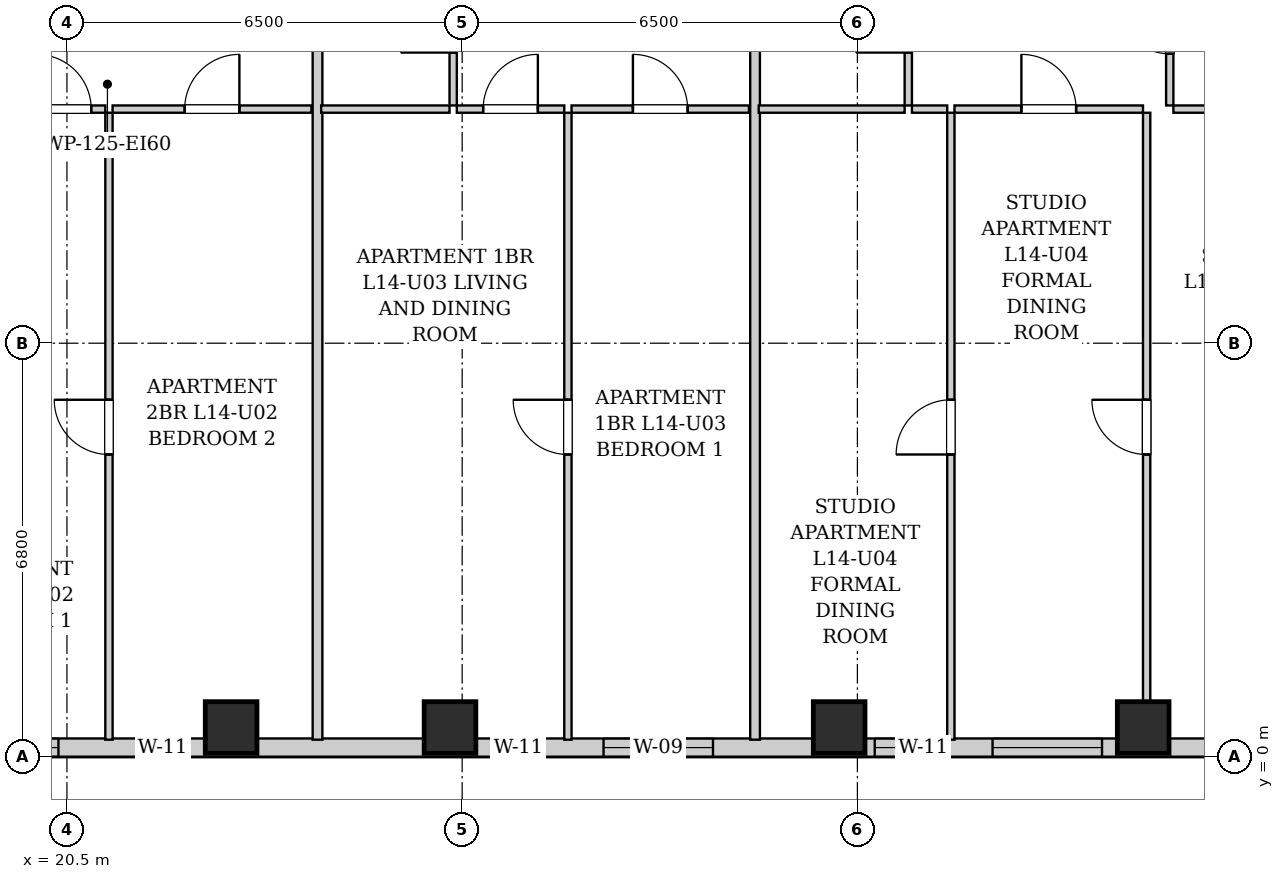
"""IFC4 building model, lengths in metres.
Left out: names, types, materials, properties, quantities, classifications, styles, units other than length and angle.
Written with IfcOpenShell. Run it as: python <this file> out.ifc"""

import sys

from ifc_helpers import new_model, si_unit, direction, frame, frame_2d, origin, origin_2d, place, context, subcontext, project, spatial, rectangle, extrude, element, fill, save


model = new_model("IFC4")
c1 = context("Model", 3, precision=1e-05, world=origin(), true_north=direction((0.0, 1.0)))
c2 = subcontext(c1, "Body", "Model", "MODEL_VIEW")
j1 = project(units=[si_unit("LENGTHUNIT", "METRE"), si_unit("PLANEANGLEUNIT", "RADIAN")], contexts=[c1])
p1 = place(None, origin())
s1 = spatial("IfcSite", under=j1, at=p1, CompositionType="ELEMENT")
p2 = place(p1, origin())
s2 = spatial("IfcBuilding", under=s1, at=p2, CompositionType="ELEMENT")
p3 = place(p2, frame((0.0, 0.0, 54.6)))
s3 = spatial("IfcBuildingStorey", under=s2, at=p3, CompositionType="ELEMENT", Elevation=54.6)
for number, where, z_axis, x_axis in (
    (1, (23.2, 0.48, 0.0), (0.0, 0.0, 1.0), (1.0, 0.0, 0.0)),
    (2, (26.8, 0.48, 0.0), (0.0, 0.0, 1.0), (1.0, 0.0, 0.0)),
    (3, (33.2, 0.48, 0.0), (0.0, 0.0, 1.0), (1.0, 0.0, 0.0)),
    (4, (38.2, 0.48, 0.0), (0.0, 0.0, 1.0), (1.0, 0.0, 0.0)),
):
    element("IfcColumn", number, at=place(p3, frame(where, z_axis=z_axis, x_axis=x_axis)), inside=s3, PredefinedType="COLUMN", context=c2, shape_type="SweptSolid", body=[
        extrude(rectangle(XDim=0.85, YDim=0.85, at=origin_2d()), origin(), (0.0, 0.0, 1.0), 3.2),
    ])
p4 = place(p3, frame((44.0, 0.15, 0.0), z_axis=(0.0, 0.0, 1.0), x_axis=(-1.0, 0.0, 0.0)))
e5 = element("IfcWall", 5, at=p4, inside=s3, PredefinedType="SOLIDWALL", context=c2, shape_type="SweptSolid", body=[
    extrude(rectangle(XDim=27.55, YDim=0.3, at=frame_2d((13.775, 0.0))), origin(), (0.0, 0.0, 1.0), 1.975),
])
p5 = place(p4, frame((23.64, 0.0, 0.55)))
e6 = element("IfcOpeningElement", 6, at=p5, cuts=e5, PredefinedType="OPENING", context=c2, shape_type="SweptSolid", body=[
    extrude(rectangle(XDim=1.8, YDim=1.2, at=frame_2d((0.9, 0.6))), frame((0.0, 0.16, 0.0), z_axis=(0.0, -1.0, 0.0), x_axis=(1.0, 0.0, 0.0)), (0.0, 0.0, 1.0), 0.32),
])
p6 = place(p4, frame((21.5, 0.0, 0.55)))
e7 = element("IfcOpeningElement", 7, at=p6, cuts=e5, PredefinedType="OPENING", context=c2, shape_type="SweptSolid", body=[
    extrude(rectangle(XDim=0.85, YDim=1.2, at=frame_2d((0.425, 0.6))), frame((0.0, 0.16, 0.0), z_axis=(0.0, -1.0, 0.0), x_axis=(1.0, 0.0, 0.0)), (0.0, 0.0, 1.0), 0.32),
])
p7 = place(p4, frame((15.65, 0.0, 0.55)))
e8 = element("IfcOpeningElement", 8, at=p7, cuts=e5, PredefinedType="OPENING", context=c2, shape_type="SweptSolid", body=[
    extrude(rectangle(XDim=0.85, YDim=1.2, at=frame_2d((0.425, 0.6))), frame((0.0, 0.16, 0.0), z_axis=(0.0, -1.0, 0.0), x_axis=(1.0, 0.0, 0.0)), (0.0, 0.0, 1.0), 0.32),
])
p8 = place(p4, frame((12.875, 0.0, 0.55)))
e9 = element("IfcOpeningElement", 9, at=p8, cuts=e5, PredefinedType="OPENING", context=c2, shape_type="SweptSolid", body=[
    extrude(rectangle(XDim=1.8, YDim=1.2, at=frame_2d((0.9, 0.6))), frame((0.0, 0.16, 0.0), z_axis=(0.0, -1.0, 0.0), x_axis=(1.0, 0.0, 0.0)), (0.0, 0.0, 1.0), 0.32),
])
p9 = place(p4, frame((9.365, 0.0, 0.55)))
e10 = element("IfcOpeningElement", 10, at=p9, cuts=e5, PredefinedType="OPENING", context=c2, shape_type="SweptSolid", body=[
    extrude(rectangle(XDim=0.85, YDim=1.2, at=frame_2d((0.425, 0.6))), frame((0.0, 0.16, 0.0), z_axis=(0.0, -1.0, 0.0), x_axis=(1.0, 0.0, 0.0)), (0.0, 0.0, 1.0), 0.32),
])
p10 = place(p4, frame((6.477, 0.0, 0.55)))
e11 = element("IfcOpeningElement", 11, at=p10, cuts=e5, PredefinedType="OPENING", context=c2, shape_type="SweptSolid", body=[
    extrude(rectangle(XDim=1.8, YDim=1.2, at=frame_2d((0.9, 0.6))), frame((0.0, 0.16, 0.0), z_axis=(0.0, -1.0, 0.0), x_axis=(1.0, 0.0, 0.0)), (0.0, 0.0, 1.0), 0.32),
])
p11 = place(p4, frame((2.186, 0.0, 0.55)))
e12 = element("IfcOpeningElement", 12, at=p11, cuts=e5, PredefinedType="OPENING", context=c2, shape_type="SweptSolid", body=[
    extrude(rectangle(XDim=1.8, YDim=1.2, at=frame_2d((0.9, 0.6))), frame((0.0, 0.16, 0.0), z_axis=(0.0, -1.0, 0.0), x_axis=(1.0, 0.0, 0.0)), (0.0, 0.0, 1.0), 0.32),
])
p12 = place(p3, frame((19.767, 10.65, 0.0), z_axis=(0.0, 0.0, 1.0), x_axis=(1.0, 0.0, 0.0)))
e13 = element("IfcWall", 13, at=p12, inside=s3, PredefinedType="PARTITIONING", context=c2, shape_type="SweptSolid", body=[
    extrude(rectangle(XDim=1.364, YDim=0.12, at=frame_2d((0.682, 0.0))), origin(), (0.0, 0.0, 1.0), 2.94),
])
p13 = place(p12, frame((0.232, 0.0, 0.0)))
e14 = element("IfcOpeningElement", 14, at=p13, cuts=e13, PredefinedType="OPENING", context=c2, shape_type="SweptSolid", body=[
    extrude(rectangle(XDim=0.9, YDim=2.05, at=frame_2d((0.45, 1.025))), frame((0.0, 0.07, 0.0), z_axis=(0.0, -1.0, 0.0), x_axis=(1.0, 0.0, 0.0)), (0.0, 0.0, 1.0), 0.14),
])
p14 = place(p3, frame((21.251, 10.65, 0.0), z_axis=(0.0, 0.0, 1.0), x_axis=(1.0, 0.0, 0.0)))
e15 = element("IfcWall", 15, at=p14, inside=s3, PredefinedType="PARTITIONING", context=c2, shape_type="SweptSolid", body=[
    extrude(rectangle(XDim=3.27, YDim=0.12, at=frame_2d((1.635, 0.0))), origin(), (0.0, 0.0, 1.0), 2.94),
])
p15 = place(p14, frame((1.185, 0.0, 0.0)))
e16 = element("IfcOpeningElement", 16, at=p15, cuts=e15, PredefinedType="OPENING", context=c2, shape_type="SweptSolid", body=[
    extrude(rectangle(XDim=0.9, YDim=2.05, at=frame_2d((0.45, 1.025))), frame((0.0, 0.07, 0.0), z_axis=(0.0, -1.0, 0.0), x_axis=(1.0, 0.0, 0.0)), (0.0, 0.0, 1.0), 0.14),
])
p16 = place(p3, frame((21.191, 0.28, 0.0), z_axis=(0.0, 0.0, 1.0), x_axis=(0.0, 1.0, 0.0)))
e17 = element("IfcWall", 17, at=p16, inside=s3, PredefinedType="PARTITIONING", context=c2, shape_type="SweptSolid", body=[
    extrude(rectangle(XDim=10.31, YDim=0.12, at=frame_2d((5.155, 0.0))), origin(), (0.0, 0.0, 1.0), 2.94),
])
p17 = place(p16, frame((4.69, 0.0, 0.0)))
e18 = element("IfcOpeningElement", 18, at=p17, cuts=e17, PredefinedType="OPENING", context=c2, shape_type="SweptSolid", body=[
    extrude(rectangle(XDim=0.9, YDim=2.05, at=frame_2d((0.45, 1.025))), frame((0.0, 0.07, 0.0), z_axis=(0.0, -1.0, 0.0), x_axis=(1.0, 0.0, 0.0)), (0.0, 0.0, 1.0), 0.14),
])
p18 = place(p3, frame((24.621, 0.28, 0.0), z_axis=(0.0, 0.0, 1.0), x_axis=(0.0, 1.0, 0.0)))
e19 = element("IfcWall", 19, at=p18, inside=s3, PredefinedType="PARTITIONING", context=c2, shape_type="SweptSolid", body=[
    extrude(rectangle(XDim=13.03, YDim=0.16, at=frame_2d((6.515, 0.0))), origin(), (0.0, 0.0, 1.0), 2.94),
])
p19 = place(p3, frame((26.852, 10.71, 0.0), z_axis=(0.0, 0.0, 1.0), x_axis=(0.0, 1.0, 0.0)))
e20 = element("IfcWall", 20, at=p19, inside=s3, PredefinedType="PARTITIONING", context=c2, shape_type="SweptSolid", body=[
    extrude(rectangle(XDim=2.6, YDim=0.12, at=frame_2d((1.3, 0.0))), origin(), (0.0, 0.0, 1.0), 2.94),
])
p20 = place(p19, frame((0.87, 0.0, 0.0)))
e21 = element("IfcOpeningElement", 21, at=p20, cuts=e20, PredefinedType="OPENING", context=c2, shape_type="SweptSolid", body=[
    extrude(rectangle(XDim=0.86, YDim=2.05, at=frame_2d((0.43, 1.025))), frame((0.0, 0.07, 0.0), z_axis=(0.0, -1.0, 0.0), x_axis=(1.0, 0.0, 0.0)), (0.0, 0.0, 1.0), 0.14),
])
p21 = place(p3, frame((24.681, 10.65, 0.0), z_axis=(0.0, 0.0, 1.0), x_axis=(1.0, 0.0, 0.0)))
e22 = element("IfcWall", 22, at=p21, inside=s3, PredefinedType="PARTITIONING", context=c2, shape_type="SweptSolid", body=[
    extrude(rectangle(XDim=2.111, YDim=0.12, at=frame_2d((1.056, 0.0))), origin(), (0.0, 0.0, 1.0), 2.94),
])
p22 = place(p3, frame((26.912, 10.65, 0.0), z_axis=(0.0, 0.0, 1.0), x_axis=(1.0, 0.0, 0.0)))
e23 = element("IfcWall", 23, at=p22, inside=s3, PredefinedType="PARTITIONING", context=c2, shape_type="SweptSolid", body=[
    extrude(rectangle(XDim=1.767, YDim=0.12, at=frame_2d((0.883, 0.0))), origin(), (0.0, 0.0, 1.0), 2.94),
])
p23 = place(p22, frame((0.433, 0.0, 0.0)))
e24 = element("IfcOpeningElement", 24, at=p23, cuts=e23, PredefinedType="OPENING", context=c2, shape_type="SweptSolid", body=[
    extrude(rectangle(XDim=0.9, YDim=2.05, at=frame_2d((0.45, 1.025))), frame((0.0, 0.07, 0.0), z_axis=(0.0, -1.0, 0.0), x_axis=(1.0, 0.0, 0.0)), (0.0, 0.0, 1.0), 0.14),
])
p24 = place(p3, frame((28.799, 10.65, 0.0), z_axis=(0.0, 0.0, 1.0), x_axis=(1.0, 0.0, 0.0)))
e25 = element("IfcWall", 25, at=p24, inside=s3, PredefinedType="PARTITIONING", context=c2, shape_type="SweptSolid", body=[
    extrude(rectangle(XDim=2.918, YDim=0.12, at=frame_2d((1.459, 0.0))), origin(), (0.0, 0.0, 1.0), 2.94),
])
p25 = place(p24, frame((1.009, 0.0, 0.0)))
e26 = element("IfcOpeningElement", 26, at=p25, cuts=e25, PredefinedType="OPENING", context=c2, shape_type="SweptSolid", body=[
    extrude(rectangle(XDim=0.9, YDim=2.05, at=frame_2d((0.45, 1.025))), frame((0.0, 0.07, 0.0), z_axis=(0.0, -1.0, 0.0), x_axis=(1.0, 0.0, 0.0)), (0.0, 0.0, 1.0), 0.14),
])
p26 = place(p3, frame((28.739, 0.28, 0.0), z_axis=(0.0, 0.0, 1.0), x_axis=(0.0, 1.0, 0.0)))
e27 = element("IfcWall", 27, at=p26, inside=s3, PredefinedType="PARTITIONING", context=c2, shape_type="SweptSolid", body=[
    extrude(rectangle(XDim=10.31, YDim=0.12, at=frame_2d((5.155, 0.0))), origin(), (0.0, 0.0, 1.0), 2.94),
])
p27 = place(p26, frame((4.69, 0.0, 0.0)))
e28 = element("IfcOpeningElement", 28, at=p27, cuts=e27, PredefinedType="OPENING", context=c2, shape_type="SweptSolid", body=[
    extrude(rectangle(XDim=0.9, YDim=2.05, at=frame_2d((0.45, 1.025))), frame((0.0, 0.07, 0.0), z_axis=(0.0, -1.0, 0.0), x_axis=(1.0, 0.0, 0.0)), (0.0, 0.0, 1.0), 0.14),
])
p28 = place(p3, frame((31.817, 0.28, 0.0), z_axis=(0.0, 0.0, 1.0), x_axis=(0.0, 1.0, 0.0)))
e29 = element("IfcWall", 29, at=p28, inside=s3, PredefinedType="PARTITIONING", context=c2, shape_type="SweptSolid", body=[
    extrude(rectangle(XDim=13.03, YDim=0.16, at=frame_2d((6.515, 0.0))), origin(), (0.0, 0.0, 1.0), 2.94),
])
p29 = place(p3, frame((34.337, 10.71, 0.0), z_axis=(0.0, 0.0, 1.0), x_axis=(0.0, 1.0, 0.0)))
e30 = element("IfcWall", 30, at=p29, inside=s3, PredefinedType="PARTITIONING", context=c2, shape_type="SweptSolid", body=[
    extrude(rectangle(XDim=2.6, YDim=0.12, at=frame_2d((1.3, 0.0))), origin(), (0.0, 0.0, 1.0), 2.94),
])
p30 = place(p29, frame((0.87, 0.0, 0.0)))
e31 = element("IfcOpeningElement", 31, at=p30, cuts=e30, PredefinedType="OPENING", context=c2, shape_type="SweptSolid", body=[
    extrude(rectangle(XDim=0.86, YDim=2.05, at=frame_2d((0.43, 1.025))), frame((0.0, 0.07, 0.0), z_axis=(0.0, -1.0, 0.0), x_axis=(1.0, 0.0, 0.0)), (0.0, 0.0, 1.0), 0.14),
])
p31 = place(p3, frame((31.877, 10.65, 0.0), z_axis=(0.0, 0.0, 1.0), x_axis=(1.0, 0.0, 0.0)))
e32 = element("IfcWall", 32, at=p31, inside=s3, PredefinedType="PARTITIONING", context=c2, shape_type="SweptSolid", body=[
    extrude(rectangle(XDim=2.4, YDim=0.12, at=frame_2d((1.2, 0.0))), origin(), (0.0, 0.0, 1.0), 2.94),
])
p32 = place(p3, frame((38.637, 10.71, 0.0), z_axis=(0.0, 0.0, 1.0), x_axis=(0.0, 1.0, 0.0)))
e33 = element("IfcWall", 33, at=p32, inside=s3, PredefinedType="PARTITIONING", context=c2, shape_type="SweptSolid", body=[
    extrude(rectangle(XDim=2.6, YDim=0.12, at=frame_2d((1.3, 0.0))), origin(), (0.0, 0.0, 1.0), 2.94),
])
p33 = place(p32, frame((0.85, 0.0, 0.0)))
e34 = element("IfcOpeningElement", 34, at=p33, cuts=e33, PredefinedType="OPENING", context=c2, shape_type="SweptSolid", body=[
    extrude(rectangle(XDim=0.9, YDim=2.05, at=frame_2d((0.45, 1.025))), frame((0.0, 0.07, 0.0), z_axis=(0.0, -1.0, 0.0), x_axis=(1.0, 0.0, 0.0)), (0.0, 0.0, 1.0), 0.14),
])
p34 = place(p3, frame((34.397, 10.65, 0.0), z_axis=(0.0, 0.0, 1.0), x_axis=(1.0, 0.0, 0.0)))
e35 = element("IfcWall", 35, at=p34, inside=s3, PredefinedType="PARTITIONING", context=c2, shape_type="SweptSolid", body=[
    extrude(rectangle(XDim=0.58, YDim=0.12, at=frame_2d((0.29, 0.0))), origin(), (0.0, 0.0, 1.0), 2.94),
])
p35 = place(p3, frame((35.097, 10.65, 0.0), z_axis=(0.0, 0.0, 1.0), x_axis=(1.0, 0.0, 0.0)))
e36 = element("IfcWall", 36, at=p35, inside=s3, PredefinedType="PARTITIONING", context=c2, shape_type="SweptSolid", body=[
    extrude(rectangle(XDim=3.1, YDim=0.12, at=frame_2d((1.55, 0.0))), origin(), (0.0, 0.0, 1.0), 2.94),
])
p36 = place(p35, frame((1.1, 0.0, 0.0)))
e37 = element("IfcOpeningElement", 37, at=p36, cuts=e36, PredefinedType="OPENING", context=c2, shape_type="SweptSolid", body=[
    extrude(rectangle(XDim=0.9, YDim=2.05, at=frame_2d((0.45, 1.025))), frame((0.0, 0.07, 0.0), z_axis=(0.0, -1.0, 0.0), x_axis=(1.0, 0.0, 0.0)), (0.0, 0.0, 1.0), 0.14),
])
p37 = place(p3, frame((38.697, 10.65, 0.0), z_axis=(0.0, 0.0, 1.0), x_axis=(1.0, 0.0, 0.0)))
e38 = element("IfcWall", 38, at=p37, inside=s3, PredefinedType="PARTITIONING", context=c2, shape_type="SweptSolid", body=[
    extrude(rectangle(XDim=3.25, YDim=0.12, at=frame_2d((1.625, 0.0))), origin(), (0.0, 0.0, 1.0), 2.94),
])
p38 = place(p37, frame((1.175, 0.0, 0.0)))
e39 = element("IfcOpeningElement", 39, at=p38, cuts=e38, PredefinedType="OPENING", context=c2, shape_type="SweptSolid", body=[
    extrude(rectangle(XDim=0.9, YDim=2.05, at=frame_2d((0.45, 1.025))), frame((0.0, 0.07, 0.0), z_axis=(0.0, -1.0, 0.0), x_axis=(1.0, 0.0, 0.0)), (0.0, 0.0, 1.0), 0.14),
])
p39 = place(p3, frame((35.037, 0.28, 0.0), z_axis=(0.0, 0.0, 1.0), x_axis=(0.0, 1.0, 0.0)))
e40 = element("IfcWall", 40, at=p39, inside=s3, PredefinedType="PARTITIONING", context=c2, shape_type="SweptSolid", body=[
    extrude(rectangle(XDim=10.31, YDim=0.12, at=frame_2d((5.155, 0.0))), origin(), (0.0, 0.0, 1.0), 2.94),
])
p40 = place(p39, frame((4.69, 0.0, 0.0)))
e41 = element("IfcOpeningElement", 41, at=p40, cuts=e40, PredefinedType="OPENING", context=c2, shape_type="SweptSolid", body=[
    extrude(rectangle(XDim=0.9, YDim=2.05, at=frame_2d((0.45, 1.025))), frame((0.0, 0.07, 0.0), z_axis=(0.0, -1.0, 0.0), x_axis=(1.0, 0.0, 0.0)), (0.0, 0.0, 1.0), 0.14),
])
p41 = place(p3, frame((38.257, 0.28, 0.0), z_axis=(0.0, 0.0, 1.0), x_axis=(0.0, 1.0, 0.0)))
e42 = element("IfcWall", 42, at=p41, inside=s3, PredefinedType="PARTITIONING", context=c2, shape_type="SweptSolid", body=[
    extrude(rectangle(XDim=10.31, YDim=0.12, at=frame_2d((5.155, 0.0))), origin(), (0.0, 0.0, 1.0), 2.94),
])
p42 = place(p41, frame((4.69, 0.0, 0.0)))
e43 = element("IfcOpeningElement", 43, at=p42, cuts=e42, PredefinedType="OPENING", context=c2, shape_type="SweptSolid", body=[
    extrude(rectangle(XDim=0.9, YDim=2.05, at=frame_2d((0.45, 1.025))), frame((0.0, 0.07, 0.0), z_axis=(0.0, -1.0, 0.0), x_axis=(1.0, 0.0, 0.0)), (0.0, 0.0, 1.0), 0.14),
])
p43 = place(p13, origin())
e44 = element("IfcDoor", 44, at=p43, inside=s3, OperationType="SINGLE_SWING_LEFT", PredefinedType="DOOR", context=c2, shape_type="SweptSolid", body=[
    extrude(rectangle(XDim=0.9, YDim=2.05, at=frame_2d((0.45, 1.025))), frame((0.0, 0.025, 0.0), z_axis=(0.0, -1.0, 0.0), x_axis=(1.0, 0.0, 0.0)), (0.0, 0.0, 1.0), 0.05),
])
fill(e14, e44)
p44 = place(p15, origin())
e45 = element("IfcDoor", 45, at=p44, inside=s3, OperationType="SINGLE_SWING_RIGHT", PredefinedType="DOOR", context=c2, shape_type="SweptSolid", body=[
    extrude(rectangle(XDim=0.9, YDim=2.05, at=frame_2d((0.45, 1.025))), frame((0.0, 0.025, 0.0), z_axis=(0.0, -1.0, 0.0), x_axis=(1.0, 0.0, 0.0)), (0.0, 0.0, 1.0), 0.05),
])
fill(e16, e45)
p45 = place(p17, origin())
e46 = element("IfcDoor", 46, at=p45, inside=s3, OperationType="SINGLE_SWING_RIGHT", PredefinedType="DOOR", context=c2, shape_type="SweptSolid", body=[
    extrude(rectangle(XDim=0.9, YDim=2.05, at=frame_2d((0.45, 1.025))), frame((0.0, 0.025, 0.0), z_axis=(0.0, -1.0, 0.0), x_axis=(1.0, 0.0, 0.0)), (0.0, 0.0, 1.0), 0.05),
])
fill(e18, e46)
p46 = place(p20, origin())
e47 = element("IfcDoor", 47, at=p46, inside=s3, OperationType="SINGLE_SWING_LEFT", PredefinedType="DOOR", context=c2, shape_type="SweptSolid", body=[
    extrude(rectangle(XDim=0.86, YDim=2.05, at=frame_2d((0.43, 1.025))), frame((0.0, 0.025, 0.0), z_axis=(0.0, -1.0, 0.0), x_axis=(1.0, 0.0, 0.0)), (0.0, 0.0, 1.0), 0.05),
])
fill(e21, e47)
p47 = place(p23, origin())
e48 = element("IfcDoor", 48, at=p47, inside=s3, OperationType="SINGLE_SWING_RIGHT", PredefinedType="DOOR", context=c2, shape_type="SweptSolid", body=[
    extrude(rectangle(XDim=0.9, YDim=2.05, at=frame_2d((0.45, 1.025))), frame((0.0, 0.025, 0.0), z_axis=(0.0, -1.0, 0.0), x_axis=(1.0, 0.0, 0.0)), (0.0, 0.0, 1.0), 0.05),
])
fill(e24, e48)
p48 = place(p25, origin())
e49 = element("IfcDoor", 49, at=p48, inside=s3, OperationType="SINGLE_SWING_LEFT", PredefinedType="DOOR", context=c2, shape_type="SweptSolid", body=[
    extrude(rectangle(XDim=0.9, YDim=2.05, at=frame_2d((0.45, 1.025))), frame((0.0, 0.025, 0.0), z_axis=(0.0, -1.0, 0.0), x_axis=(1.0, 0.0, 0.0)), (0.0, 0.0, 1.0), 0.05),
])
fill(e26, e49)
p49 = place(p27, origin())
e50 = element("IfcDoor", 50, at=p49, inside=s3, OperationType="SINGLE_SWING_RIGHT", PredefinedType="DOOR", context=c2, shape_type="SweptSolid", body=[
    extrude(rectangle(XDim=0.9, YDim=2.05, at=frame_2d((0.45, 1.025))), frame((0.0, 0.025, 0.0), z_axis=(0.0, -1.0, 0.0), x_axis=(1.0, 0.0, 0.0)), (0.0, 0.0, 1.0), 0.05),
])
fill(e28, e50)
p50 = place(p30, origin())
e51 = element("IfcDoor", 51, at=p50, inside=s3, OperationType="SINGLE_SWING_LEFT", PredefinedType="DOOR", context=c2, shape_type="SweptSolid", body=[
    extrude(rectangle(XDim=0.86, YDim=2.05, at=frame_2d((0.43, 1.025))), frame((0.0, 0.025, 0.0), z_axis=(0.0, -1.0, 0.0), x_axis=(1.0, 0.0, 0.0)), (0.0, 0.0, 1.0), 0.05),
])
fill(e31, e51)
p51 = place(p33, origin())
e52 = element("IfcDoor", 52, at=p51, inside=s3, OperationType="SINGLE_SWING_RIGHT", PredefinedType="DOOR", context=c2, shape_type="SweptSolid", body=[
    extrude(rectangle(XDim=0.9, YDim=2.05, at=frame_2d((0.45, 1.025))), frame((0.0, 0.025, 0.0), z_axis=(0.0, -1.0, 0.0), x_axis=(1.0, 0.0, 0.0)), (0.0, 0.0, 1.0), 0.05),
])
fill(e34, e52)
p52 = place(p36, origin())
e53 = element("IfcDoor", 53, at=p52, inside=s3, OperationType="SINGLE_SWING_LEFT", PredefinedType="DOOR", context=c2, shape_type="SweptSolid", body=[
    extrude(rectangle(XDim=0.9, YDim=2.05, at=frame_2d((0.45, 1.025))), frame((0.0, 0.025, 0.0), z_axis=(0.0, -1.0, 0.0), x_axis=(1.0, 0.0, 0.0)), (0.0, 0.0, 1.0), 0.05),
])
fill(e37, e53)
p53 = place(p40, origin())
e54 = element("IfcDoor", 54, at=p53, inside=s3, OperationType="SINGLE_SWING_LEFT", PredefinedType="DOOR", context=c2, shape_type="SweptSolid", body=[
    extrude(rectangle(XDim=0.9, YDim=2.05, at=frame_2d((0.45, 1.025))), frame((0.0, 0.025, 0.0), z_axis=(0.0, -1.0, 0.0), x_axis=(1.0, 0.0, 0.0)), (0.0, 0.0, 1.0), 0.05),
])
fill(e41, e54)
p54 = place(p42, origin())
e55 = element("IfcDoor", 55, at=p54, inside=s3, OperationType="SINGLE_SWING_RIGHT", PredefinedType="DOOR", context=c2, shape_type="SweptSolid", body=[
    extrude(rectangle(XDim=0.9, YDim=2.05, at=frame_2d((0.45, 1.025))), frame((0.0, 0.025, 0.0), z_axis=(0.0, -1.0, 0.0), x_axis=(1.0, 0.0, 0.0)), (0.0, 0.0, 1.0), 0.05),
])
fill(e43, e55)
p55 = place(p5, origin())
e56 = element("IfcWindow", 56, at=p55, inside=s3, PartitioningType="DOUBLE_PANEL_VERTICAL", PredefinedType="WINDOW", context=c2, shape_type="SweptSolid", body=[
    extrude(rectangle(XDim=1.8, YDim=1.2, at=frame_2d((0.9, 0.6))), frame((0.0, 0.03, 0.0), z_axis=(0.0, -1.0, 0.0), x_axis=(1.0, 0.0, 0.0)), (0.0, 0.0, 1.0), 0.06),
])
fill(e6, e56)
p56 = place(p6, origin())
e57 = element("IfcWindow", 57, at=p56, inside=s3, PartitioningType="SINGLE_PANEL", PredefinedType="WINDOW", context=c2, shape_type="SweptSolid", body=[
    extrude(rectangle(XDim=0.85, YDim=1.2, at=frame_2d((0.425, 0.6))), frame((0.0, 0.03, 0.0), z_axis=(0.0, -1.0, 0.0), x_axis=(1.0, 0.0, 0.0)), (0.0, 0.0, 1.0), 0.06),
])
fill(e7, e57)
p57 = place(p7, origin())
e58 = element("IfcWindow", 58, at=p57, inside=s3, PartitioningType="SINGLE_PANEL", PredefinedType="WINDOW", context=c2, shape_type="SweptSolid", body=[
    extrude(rectangle(XDim=0.85, YDim=1.2, at=frame_2d((0.425, 0.6))), frame((0.0, 0.03, 0.0), z_axis=(0.0, -1.0, 0.0), x_axis=(1.0, 0.0, 0.0)), (0.0, 0.0, 1.0), 0.06),
])
fill(e8, e58)
p58 = place(p8, origin())
e59 = element("IfcWindow", 59, at=p58, inside=s3, PartitioningType="DOUBLE_PANEL_VERTICAL", PredefinedType="WINDOW", context=c2, shape_type="SweptSolid", body=[
    extrude(rectangle(XDim=1.8, YDim=1.2, at=frame_2d((0.9, 0.6))), frame((0.0, 0.03, 0.0), z_axis=(0.0, -1.0, 0.0), x_axis=(1.0, 0.0, 0.0)), (0.0, 0.0, 1.0), 0.06),
])
fill(e9, e59)
p59 = place(p9, origin())
e60 = element("IfcWindow", 60, at=p59, inside=s3, PartitioningType="SINGLE_PANEL", PredefinedType="WINDOW", context=c2, shape_type="SweptSolid", body=[
    extrude(rectangle(XDim=0.85, YDim=1.2, at=frame_2d((0.425, 0.6))), frame((0.0, 0.03, 0.0), z_axis=(0.0, -1.0, 0.0), x_axis=(1.0, 0.0, 0.0)), (0.0, 0.0, 1.0), 0.06),
])
fill(e10, e60)
p60 = place(p10, origin())
e61 = element("IfcWindow", 61, at=p60, inside=s3, PartitioningType="DOUBLE_PANEL_VERTICAL", PredefinedType="WINDOW", context=c2, shape_type="SweptSolid", body=[
    extrude(rectangle(XDim=1.8, YDim=1.2, at=frame_2d((0.9, 0.6))), frame((0.0, 0.03, 0.0), z_axis=(0.0, -1.0, 0.0), x_axis=(1.0, 0.0, 0.0)), (0.0, 0.0, 1.0), 0.06),
])
fill(e11, e61)
save(model, sys.argv[1])
